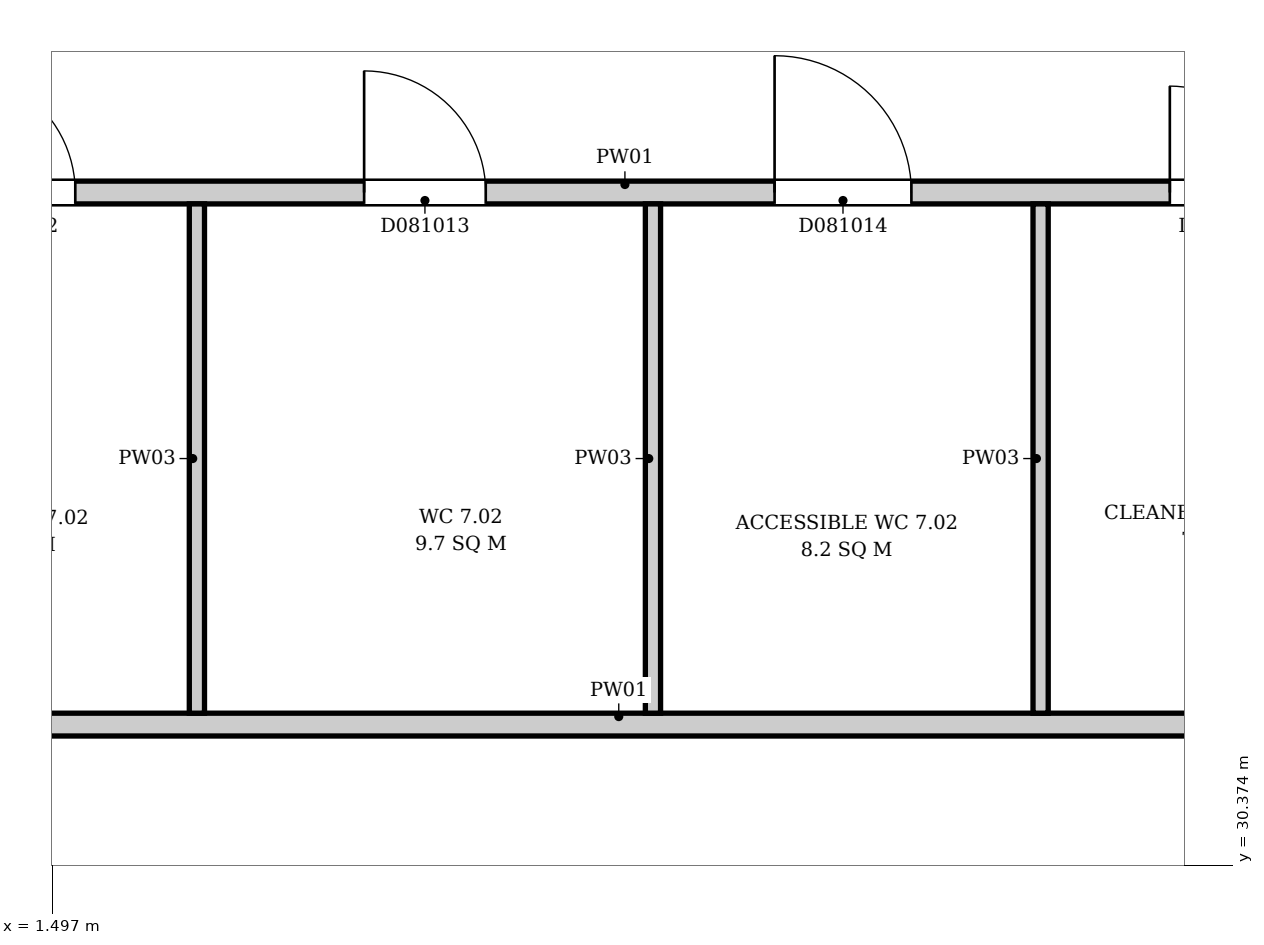
"""IFC4 building model, lengths in metres.
Left out: names, types, materials, properties, quantities, classifications, styles, units other than length and angle.
Written with IfcOpenShell. Run it as: python <this file> out.ifc"""

import sys

from ifc_helpers import new_model, si_unit, direction, frame, frame_2d, origin, place, context, subcontext, project, spatial, rectangle, extrude, element, fill, save


model = new_model("IFC4")
c1 = context("Model", 3, precision=1e-05, world=origin(), true_north=direction((0.0, 1.0)))
c2 = subcontext(c1, "Body", "Model", "MODEL_VIEW")
j1 = project(units=[si_unit("LENGTHUNIT", "METRE"), si_unit("PLANEANGLEUNIT", "RADIAN")], contexts=[c1])
p1 = place(None, origin())
s1 = spatial("IfcSite", under=j1, at=p1, CompositionType="ELEMENT")
p2 = place(p1, origin())
s2 = spatial("IfcBuilding", under=s1, at=p2, CompositionType="ELEMENT")
p3 = place(p2, frame((0.0, 0.0, 40.3)))
s3 = spatial("IfcBuildingStorey", under=s2, at=p3, CompositionType="ELEMENT", Elevation=40.3)
p4 = place(p3, frame((0.056, 31.3, 0.0), z_axis=(0.0, 0.0, 1.0), x_axis=(1.0, 0.0, 0.0)))
e1 = element("IfcWall", 1, at=p4, inside=s3, PredefinedType="PARTITIONING", context=c2, shape_type="SweptSolid", body=[
    extrude(rectangle(XDim=10.338, YDim=0.15, at=frame_2d((5.169, 0.0))), origin(), (0.0, 0.0, 1.0), 3.9),
])
p5 = place(p3, frame((0.056, 34.8, 0.0), z_axis=(0.0, 0.0, 1.0), x_axis=(1.0, 0.0, 0.0)))
e2 = element("IfcWall", 2, at=p5, inside=s3, PredefinedType="PARTITIONING", context=c2, shape_type="SweptSolid", body=[
    extrude(rectangle(XDim=10.419, YDim=0.15, at=frame_2d((5.209, 0.0))), origin(), (0.0, 0.0, 1.0), 3.9),
])
p6 = place(p5, frame((0.794, 0.0, 0.0)))
e3 = element("IfcOpeningElement", 3, at=p6, cuts=e2, PredefinedType="OPENING", context=c2, shape_type="SweptSolid", body=[
    extrude(rectangle(XDim=0.8, YDim=2.1, at=frame_2d((0.4, 1.05))), frame((0.0, 0.085, 0.0), z_axis=(0.0, -1.0, 0.0), x_axis=(1.0, 0.0, 0.0)), (0.0, 0.0, 1.0), 0.17),
])
p7 = place(p5, frame((3.494, 0.0, 0.0)))
e4 = element("IfcOpeningElement", 4, at=p7, cuts=e2, PredefinedType="OPENING", context=c2, shape_type="SweptSolid", body=[
    extrude(rectangle(XDim=0.8, YDim=2.1, at=frame_2d((0.4, 1.05))), frame((0.0, 0.085, 0.0), z_axis=(0.0, -1.0, 0.0), x_axis=(1.0, 0.0, 0.0)), (0.0, 0.0, 1.0), 0.17),
])
p8 = place(p5, frame((6.194, 0.0, 0.0)))
e5 = element("IfcOpeningElement", 5, at=p8, cuts=e2, PredefinedType="OPENING", context=c2, shape_type="SweptSolid", body=[
    extrude(rectangle(XDim=0.9, YDim=2.1, at=frame_2d((0.45, 1.05))), frame((0.0, 0.085, 0.0), z_axis=(0.0, -1.0, 0.0), x_axis=(1.0, 0.0, 0.0)), (0.0, 0.0, 1.0), 0.17),
])
p9 = place(p5, frame((8.794, 0.0, 0.0)))
e6 = element("IfcOpeningElement", 6, at=p9, cuts=e2, PredefinedType="OPENING", context=c2, shape_type="SweptSolid", body=[
    extrude(rectangle(XDim=0.7, YDim=2.1, at=frame_2d((0.35, 1.05))), frame((0.0, 0.085, 0.0), z_axis=(0.0, -1.0, 0.0), x_axis=(1.0, 0.0, 0.0)), (0.0, 0.0, 1.0), 0.17),
])
for number, where, z_axis, x_axis in (
    (7, (2.45, 31.375, 0.0), (0.0, 0.0, 1.0), (0.0, 1.0, 0.0)),
    (8, (5.45, 31.375, 0.0), (0.0, 0.0, 1.0), (0.0, 1.0, 0.0)),
    (9, (8.0, 31.375, 0.0), (0.0, 0.0, 1.0), (0.0, 1.0, 0.0)),
):
    element("IfcWall", number, at=place(p3, frame(where, z_axis=z_axis, x_axis=x_axis)), inside=s3, PredefinedType="PARTITIONING", context=c2, shape_type="SweptSolid", body=[
        extrude(rectangle(XDim=3.35, YDim=0.1, at=frame_2d((1.675, 0.0))), origin(), (0.0, 0.0, 1.0), 3.9),
    ])
p10 = place(p6, origin())
e10 = element("IfcDoor", 10, at=p10, inside=s3, OperationType="SINGLE_SWING_RIGHT", PredefinedType="DOOR", context=c2, shape_type="SweptSolid", body=[
    extrude(rectangle(XDim=0.8, YDim=2.1, at=frame_2d((0.4, 1.05))), frame((0.0, 0.025, 0.0), z_axis=(0.0, -1.0, 0.0), x_axis=(1.0, 0.0, 0.0)), (0.0, 0.0, 1.0), 0.05),
])
fill(e3, e10)
p11 = place(p7, origin())
e11 = element("IfcDoor", 11, at=p11, inside=s3, OperationType="SINGLE_SWING_LEFT", PredefinedType="DOOR", context=c2, shape_type="SweptSolid", body=[
    extrude(rectangle(XDim=0.8, YDim=2.1, at=frame_2d((0.4, 1.05))), frame((0.0, 0.025, 0.0), z_axis=(0.0, -1.0, 0.0), x_axis=(1.0, 0.0, 0.0)), (0.0, 0.0, 1.0), 0.05),
])
fill(e4, e11)
p12 = place(p8, origin())
e12 = element("IfcDoor", 12, at=p12, inside=s3, OperationType="SINGLE_SWING_LEFT", PredefinedType="DOOR", context=c2, shape_type="SweptSolid", body=[
    extrude(rectangle(XDim=0.9, YDim=2.1, at=frame_2d((0.45, 1.05))), frame((0.0, 0.025, 0.0), z_axis=(0.0, -1.0, 0.0), x_axis=(1.0, 0.0, 0.0)), (0.0, 0.0, 1.0), 0.05),
])
fill(e5, e12)
p13 = place(p9, origin())
e13 = element("IfcDoor", 13, at=p13, inside=s3, OperationType="SINGLE_SWING_LEFT", PredefinedType="DOOR", context=c2, shape_type="SweptSolid", body=[
    extrude(rectangle(XDim=0.7, YDim=2.1, at=frame_2d((0.35, 1.05))), frame((0.0, 0.025, 0.0), z_axis=(0.0, -1.0, 0.0), x_axis=(1.0, 0.0, 0.0)), (0.0, 0.0, 1.0), 0.05),
])
fill(e6, e13)
save(model, sys.argv[1])
